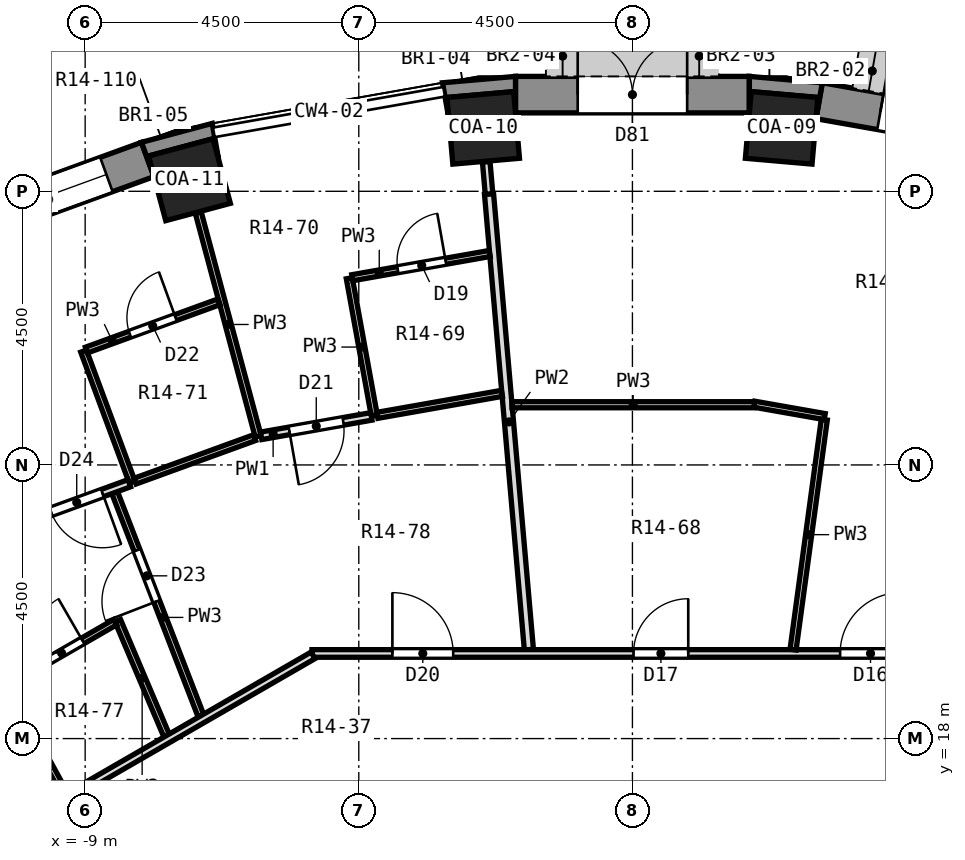
"""IFC4 building model, lengths in metres.
Left out: names, types, materials, properties, quantities, classifications, styles, units other than length and angle.
Written with IfcOpenShell. Run it as: python <this file> out.ifc"""

import sys

from ifc_helpers import new_model, si_unit, direction, frame, frame_2d, origin, origin_2d, place, context, subcontext, project, spatial, polyline, rectangle, outline, extrude, element, fill, save


model = new_model("IFC4")
c1 = context("Model", 3, precision=1e-05, world=origin(), true_north=direction((0.0, 1.0)))
c2 = subcontext(c1, "Body", "Model", "MODEL_VIEW")
j1 = project(units=[si_unit("LENGTHUNIT", "METRE"), si_unit("PLANEANGLEUNIT", "RADIAN")], contexts=[c1])
p1 = place(None, origin())
s1 = spatial("IfcSite", under=j1, at=p1, CompositionType="ELEMENT")
p2 = place(p1, origin())
s2 = spatial("IfcBuilding", under=s1, at=p2, CompositionType="ELEMENT")
p3 = place(p2, frame((0.0, 0.0, 75.8)))
s3 = spatial("IfcBuildingStorey", under=s2, at=p3, CompositionType="ELEMENT", Elevation=75.8)
for number, where, z_axis, x_axis in (
    (1, (2.453, 28.043, 0.0), (0.0, 0.0, 1.0), (0.087, 0.996, 0.0)),
    (2, (-2.453, 28.043, 0.0), (0.0, 0.0, 1.0), (-0.087, 0.996, 0.0)),
    (3, (-7.286, 27.191, 0.0), (0.0, 0.0, 1.0), (-0.259, 0.966, 0.0)),
):
    element("IfcColumn", number, at=place(p3, frame(where, z_axis=z_axis, x_axis=x_axis)), inside=s3, PredefinedType="COLUMN", context=c2, shape_type="SweptSolid", body=[
        extrude(rectangle(XDim=1.1, YDim=1.1, at=origin_2d()), origin(), (0.0, 0.0, 1.0), 3.3),
    ])
p4 = place(p3, frame((6.858, 27.821, 0.0), z_axis=(0.0, 0.0, 1.0), x_axis=(-0.984800809218, 0.173687553279, 0.0)))
e4 = element("IfcWall", 4, at=p4, inside=s3, PredefinedType="SOLIDWALL", context=c2, shape_type="SweptSolid", body=[
    extrude(rectangle(XDim=3.846, YDim=0.6, at=frame_2d((1.923, 0.0))), origin(), (0.0, 0.0, 1.0), 2.75),
])
p5 = place(p4, frame((1.023, 0.0, 0.0)))
e5 = element("IfcOpeningElement", 5, at=p5, cuts=e4, PredefinedType="OPENING", context=c2, shape_type="SweptSolid", body=[
    extrude(rectangle(XDim=1.8, YDim=2.4, at=frame_2d((0.9, 1.2))), frame((0.0, 0.312, 0.0), z_axis=(0.0, -1.0, 0.0), x_axis=(1.0, 0.0, 0.0)), (0.0, 0.0, 1.0), 0.624),
])
p6 = place(p3, frame((1.923, 28.59, 0.0), z_axis=(0.0, 0.0, 1.0), x_axis=(-1.0, 0.0, 0.0)))
e6 = element("IfcWall", 6, at=p6, inside=s3, PredefinedType="SOLIDWALL", context=c2, shape_type="SweptSolid", body=[
    extrude(rectangle(XDim=3.846, YDim=0.6, at=frame_2d((1.923, 0.0))), origin(), (0.0, 0.0, 1.0), 2.75),
])
p7 = place(p6, frame((1.023, 0.0, 0.0)))
e7 = element("IfcOpeningElement", 7, at=p7, cuts=e6, PredefinedType="OPENING", context=c2, shape_type="SweptSolid", body=[
    extrude(rectangle(XDim=1.8, YDim=2.4, at=frame_2d((0.9, 1.2))), frame((0.0, 0.312, 0.0), z_axis=(0.0, -1.0, 0.0), x_axis=(1.0, 0.0, 0.0)), (0.0, 0.0, 1.0), 0.624),
])
p8 = place(p3, frame((-7.971, 27.523, 0.0), z_axis=(0.0, 0.0, 1.0), x_axis=(-0.939689588564, -0.342028474173, 0.0)))
e8 = element("IfcWall", 8, at=p8, inside=s3, PredefinedType="SOLIDWALL", context=c2, shape_type="SweptSolid", body=[
    extrude(rectangle(XDim=3.846, YDim=0.6, at=frame_2d((1.923, 0.0))), origin(), (0.0, 0.0, 1.0), 2.75),
])
p9 = place(p8, frame((0.723, 0.0, 0.9)))
e9 = element("IfcOpeningElement", 9, at=p9, cuts=e8, PredefinedType="OPENING", context=c2, shape_type="SweptSolid", body=[
    extrude(rectangle(XDim=2.4, YDim=1.8, at=frame_2d((1.2, 0.9))), frame((0.0, 0.312, 0.0), z_axis=(0.0, -1.0, 0.0), x_axis=(1.0, 0.0, 0.0)), (0.0, 0.0, 1.0), 0.624),
])
p10 = place(p3, origin())
e10 = element("IfcWall", 10, at=p10, inside=s3, PredefinedType="SOLIDWALL", context=c2, shape_type="SweptSolid", body=[
    extrude(outline(polyline([(3.123, 28.785), (1.923, 28.89), (1.923, 28.29), (1.954, 28.639), (3.049, 28.543), (3.019, 28.194), (3.123, 28.785)])), origin(), (0.0, 0.0, 1.0), 2.75),
])
p11 = place(p3, origin())
e11 = element("IfcWall", 11, at=p11, inside=s3, PredefinedType="SOLIDWALL", context=c2, shape_type="SweptSolid", body=[
    extrude(outline(polyline([(-1.923, 28.89), (-3.123, 28.785), (-3.019, 28.194), (-3.049, 28.543), (-1.954, 28.639), (-1.923, 28.29), (-1.923, 28.89)])), origin(), (0.0, 0.0, 1.0), 2.75),
])
p12 = place(p3, origin())
e12 = element("IfcWall", 12, at=p12, inside=s3, PredefinedType="SOLIDWALL", context=c2, shape_type="SweptSolid", body=[
    extrude(outline(polyline([(-6.91, 28.117), (-8.074, 27.805), (-7.869, 27.241), (-7.959, 27.58), (-6.897, 27.865), (-6.806, 27.526), (-6.91, 28.117)])), origin(), (0.0, 0.0, 1.0), 2.75),
])
p13 = place(p3, frame((-2.405, 27.485, 0.0), z_axis=(0.0, 0.0, 1.0), x_axis=(0.087200931266, -0.996190743576, 0.0)))
e13 = element("IfcWall", 13, at=p13, inside=s3, PredefinedType="PARTITIONING", context=c2, shape_type="SweptSolid", body=[
    extrude(rectangle(XDim=0.535, YDim=0.125, at=frame_2d((0.267, 0.0))), origin(), (0.0, 0.0, 1.0), 2.75),
])
p14 = place(p3, frame((-2.358, 26.952, 0.0), z_axis=(0.0, 0.0, 1.0), x_axis=(0.087150838373, -0.996195127157, 0.0)))
e14 = element("IfcWall", 14, at=p14, inside=s3, PredefinedType="PARTITIONING", context=c2, shape_type="SweptSolid", body=[
    extrude(rectangle(XDim=7.519, YDim=0.15, at=frame_2d((3.759, 0.0))), origin(), (0.0, 0.0, 1.0), 2.75),
])
p15 = place(p3, frame((-4.656, 25.57, 0.0), z_axis=(0.0, 0.0, 1.0), x_axis=(0.179146935465, -0.983822329241, 0.0)))
e15 = element("IfcWall", 15, at=p15, inside=s3, PredefinedType="PARTITIONING", context=c2, shape_type="SweptSolid", body=[
    extrude(rectangle(XDim=2.3, YDim=0.1, at=frame_2d((1.15, 0.0))), origin(), (0.0, 0.0, 1.0), 2.75),
])
p16 = place(p3, frame((-7.14, 26.65, 0.0), z_axis=(0.0, 0.0, 1.0), x_axis=(0.258575921205, -0.965990938349, 0.0)))
e16 = element("IfcWall", 16, at=p16, inside=s3, PredefinedType="PARTITIONING", context=c2, shape_type="SweptSolid", body=[
    extrude(rectangle(XDim=3.81, YDim=0.1, at=frame_2d((1.905, 0.0))), origin(), (0.0, 0.0, 1.0), 2.75),
])
p17 = place(p3, frame((-9.026, 24.372, 0.0), z_axis=(0.0, 0.0, 1.0), x_axis=(0.347431936108, -0.937705204087, 0.0)))
e17 = element("IfcWall", 17, at=p17, inside=s3, PredefinedType="PARTITIONING", context=c2, shape_type="SweptSolid", body=[
    extrude(rectangle(XDim=2.299, YDim=0.1, at=frame_2d((1.15, 0.0))), origin(), (0.0, 0.0, 1.0), 2.75),
])
p18 = place(p3, frame((-8.514, 22.045, 0.0), z_axis=(0.0, 0.0, 1.0), x_axis=(0.360450824224, -0.932778217647, 0.0)))
e18 = element("IfcWall", 18, at=p18, inside=s3, PredefinedType="PARTITIONING", context=c2, shape_type="SweptSolid", body=[
    extrude(rectangle(XDim=3.934, YDim=0.1, at=frame_2d((1.967, 0.0))), origin(), (0.0, 0.0, 1.0), 2.75),
])
p19 = place(p18, frame((1.017, 0.0, 0.0)))
e19 = element("IfcOpeningElement", 19, at=p19, cuts=e18, PredefinedType="OPENING", context=c2, shape_type="SweptSolid", body=[
    extrude(rectangle(XDim=0.9, YDim=2.1, at=frame_2d((0.45, 1.05))), frame((0.0, 0.062, 0.0), z_axis=(0.0, -1.0, 0.0), x_axis=(1.0, 0.0, 0.0)), (0.0, 0.0, 1.0), 0.124),
])
p20 = place(p3, frame((-8.464, 19.939, 0.0), z_axis=(0.0, 0.0, 1.0), x_axis=(0.391032350376, -0.920376934174, 0.0)))
e20 = element("IfcWall", 20, at=p20, inside=s3, PredefinedType="PARTITIONING", context=c2, shape_type="SweptSolid", body=[
    extrude(rectangle(XDim=2.053, YDim=0.1, at=frame_2d((1.026, 0.0))), origin(), (0.0, 0.0, 1.0), 2.75),
])
p21 = place(p3, frame((-10.31, 18.874, 0.0), z_axis=(0.0, 0.0, 1.0), x_axis=(0.479305195881, -0.877648294707, 0.0)))
e21 = element("IfcWall", 21, at=p21, inside=s3, PredefinedType="PARTITIONING", context=c2, shape_type="SweptSolid", body=[
    extrude(rectangle(XDim=2.039, YDim=0.1, at=frame_2d((1.019, 0.0))), origin(), (0.0, 0.0, 1.0), 2.75),
])
p22 = place(p3, frame((2.005, 23.499, 0.0), z_axis=(0.0, 0.0, 1.0), x_axis=(0.984835805664, -0.17348900796, 0.0)))
e22 = element("IfcWall", 22, at=p22, inside=s3, PredefinedType="PARTITIONING", context=c2, shape_type="SweptSolid", body=[
    extrude(rectangle(XDim=1.175, YDim=0.1, at=frame_2d((0.587, 0.0))), origin(), (0.0, 0.0, 1.0), 2.75),
])
p23 = place(p3, frame((-5.27, 19.4, 0.0), z_axis=(0.0, 0.0, 1.0), x_axis=(1.0, 0.0, 0.0)))
e23 = element("IfcWall", 23, at=p23, inside=s3, PredefinedType="PARTITIONING", context=c2, shape_type="SweptSolid", body=[
    extrude(rectangle(XDim=10.406, YDim=0.125, at=frame_2d((5.203, 0.0))), origin(), (0.0, 0.0, 1.0), 2.75),
])
p24 = place(p23, frame((8.686, 0.0, 0.0)))
e24 = element("IfcOpeningElement", 24, at=p24, cuts=e23, PredefinedType="OPENING", context=c2, shape_type="SweptSolid", body=[
    extrude(rectangle(XDim=1.0, YDim=2.1, at=frame_2d((0.5, 1.05))), frame((0.0, 0.074, 0.0), z_axis=(0.0, -1.0, 0.0), x_axis=(1.0, 0.0, 0.0)), (0.0, 0.0, 1.0), 0.149),
])
p25 = place(p23, frame((5.288, 0.0, 0.0)))
e25 = element("IfcOpeningElement", 25, at=p25, cuts=e23, PredefinedType="OPENING", context=c2, shape_type="SweptSolid", body=[
    extrude(rectangle(XDim=0.9, YDim=2.1, at=frame_2d((0.45, 1.05))), frame((0.0, 0.074, 0.0), z_axis=(0.0, -1.0, 0.0), x_axis=(1.0, 0.0, 0.0)), (0.0, 0.0, 1.0), 0.149),
])
p26 = place(p23, frame((1.323, 0.0, 0.0)))
e26 = element("IfcOpeningElement", 26, at=p26, cuts=e23, PredefinedType="OPENING", context=c2, shape_type="SweptSolid", body=[
    extrude(rectangle(XDim=1.0, YDim=2.1, at=frame_2d((0.5, 1.05))), frame((0.0, 0.074, 0.0), z_axis=(0.0, -1.0, 0.0), x_axis=(1.0, 0.0, 0.0)), (0.0, 0.0, 1.0), 0.149),
])
p27 = place(p3, frame((-1.98, 23.49, 0.0), z_axis=(0.0, 0.0, 1.0), x_axis=(1.0, 0.0, 0.0)))
e27 = element("IfcWall", 27, at=p27, inside=s3, PredefinedType="PARTITIONING", context=c2, shape_type="SweptSolid", body=[
    extrude(rectangle(XDim=3.985, YDim=0.1, at=frame_2d((1.992, 0.0))), origin(), (0.0, 0.0, 1.0), 2.75),
])
p28 = place(p3, frame((-4.195, 23.316, 0.0), z_axis=(0.0, 0.0, 1.0), x_axis=(0.984788286148, 0.173758543574, 0.0)))
e28 = element("IfcWall", 28, at=p28, inside=s3, PredefinedType="PARTITIONING", context=c2, shape_type="SweptSolid", body=[
    extrude(rectangle(XDim=2.08, YDim=0.1, at=frame_2d((1.04, 0.0))), origin(), (0.0, 0.0, 1.0), 2.75),
])
p29 = place(p3, frame((-6.106, 22.979, 0.0), z_axis=(0.0, 0.0, 1.0), x_axis=(0.984808921368, 0.173641551464, 0.0)))
e29 = element("IfcWall", 29, at=p29, inside=s3, PredefinedType="PARTITIONING", context=c2, shape_type="SweptSolid", body=[
    extrude(rectangle(XDim=1.841, YDim=0.125, at=frame_2d((0.92, 0.0))), origin(), (0.0, 0.0, 1.0), 2.75),
])
p30 = place(p29, frame((0.47, 0.0, 0.0)))
e30 = element("IfcOpeningElement", 30, at=p30, cuts=e29, PredefinedType="OPENING", context=c2, shape_type="SweptSolid", body=[
    extrude(rectangle(XDim=0.9, YDim=2.1, at=frame_2d((0.45, 1.05))), frame((0.0, 0.074, 0.0), z_axis=(0.0, -1.0, 0.0), x_axis=(1.0, 0.0, 0.0)), (0.0, 0.0, 1.0), 0.149),
])
p31 = place(p3, frame((-4.607, 25.579, 0.0), z_axis=(0.0, 0.0, 1.0), x_axis=(0.984796414822, 0.173712467465, 0.0)))
e31 = element("IfcWall", 31, at=p31, inside=s3, PredefinedType="PARTITIONING", context=c2, shape_type="SweptSolid", body=[
    extrude(rectangle(XDim=2.294, YDim=0.1, at=frame_2d((1.147, 0.0))), origin(), (0.0, 0.0, 1.0), 2.75),
])
p32 = place(p31, frame((0.76, 0.0, 0.0)))
e32 = element("IfcOpeningElement", 32, at=p32, cuts=e31, PredefinedType="OPENING", context=c2, shape_type="SweptSolid", body=[
    extrude(rectangle(XDim=0.8, YDim=2.1, at=frame_2d((0.4, 1.05))), frame((0.0, 0.062, 0.0), z_axis=(0.0, -1.0, 0.0), x_axis=(1.0, 0.0, 0.0)), (0.0, 0.0, 1.0), 0.124),
])
p33 = place(p3, frame((-8.18, 22.233, 0.0), z_axis=(0.0, 0.0, 1.0), x_axis=(0.939708229367, 0.341977256056, 0.0)))
e33 = element("IfcWall", 33, at=p33, inside=s3, PredefinedType="PARTITIONING", context=c2, shape_type="SweptSolid", body=[
    extrude(rectangle(XDim=2.093, YDim=0.1, at=frame_2d((1.046, 0.0))), origin(), (0.0, 0.0, 1.0), 2.75),
])
p34 = place(p3, frame((-10.11, 21.53, 0.0), z_axis=(0.0, 0.0, 1.0), x_axis=(0.939599898996, 0.342274786986, 0.0)))
e34 = element("IfcWall", 34, at=p34, inside=s3, PredefinedType="PARTITIONING", context=c2, shape_type="SweptSolid", body=[
    extrude(rectangle(XDim=1.954, YDim=0.125, at=frame_2d((0.977, 0.0))), origin(), (0.0, 0.0, 1.0), 2.75),
])
p35 = place(p34, frame((0.583, 0.0, 0.0)))
e35 = element("IfcOpeningElement", 35, at=p35, cuts=e34, PredefinedType="OPENING", context=c2, shape_type="SweptSolid", body=[
    extrude(rectangle(XDim=0.9, YDim=2.1, at=frame_2d((0.45, 1.05))), frame((0.0, 0.074, 0.0), z_axis=(0.0, -1.0, 0.0), x_axis=(1.0, 0.0, 0.0)), (0.0, 0.0, 1.0), 0.149),
])
p36 = place(p3, frame((-8.979, 24.389, 0.0), z_axis=(0.0, 0.0, 1.0), x_axis=(0.93967659433, 0.342064172443, 0.0)))
e36 = element("IfcWall", 36, at=p36, inside=s3, PredefinedType="PARTITIONING", context=c2, shape_type="SweptSolid", body=[
    extrude(rectangle(XDim=2.32, YDim=0.1, at=frame_2d((1.16, 0.0))), origin(), (0.0, 0.0, 1.0), 2.75),
])
p37 = place(p36, frame((0.76, 0.0, 0.0)))
e37 = element("IfcOpeningElement", 37, at=p37, cuts=e36, PredefinedType="OPENING", context=c2, shape_type="SweptSolid", body=[
    extrude(rectangle(XDim=0.8, YDim=2.1, at=frame_2d((0.4, 1.05))), frame((0.0, 0.062, 0.0), z_axis=(0.0, -1.0, 0.0), x_axis=(1.0, 0.0, 0.0)), (0.0, 0.0, 1.0), 0.124),
])
p38 = place(p3, frame((-14.137, 14.24, 0.0), z_axis=(0.0, 0.0, 1.0), x_axis=(0.866045301435, 0.499965534674, 0.0)))
e38 = element("IfcWall", 38, at=p38, inside=s3, PredefinedType="PARTITIONING", context=c2, shape_type="SweptSolid", body=[
    extrude(rectangle(XDim=10.259, YDim=0.125, at=frame_2d((5.129, 0.0))), origin(), (0.0, 0.0, 1.0), 2.75),
])
p39 = place(p3, frame((-10.267, 18.899, 0.0), z_axis=(0.0, 0.0, 1.0), x_axis=(0.866149564305, 0.499784885981, 0.0)))
e39 = element("IfcWall", 39, at=p39, inside=s3, PredefinedType="PARTITIONING", context=c2, shape_type="SweptSolid", body=[
    extrude(rectangle(XDim=2.031, YDim=0.1, at=frame_2d((1.016, 0.0))), origin(), (0.0, 0.0, 1.0), 2.75),
])
p40 = place(p39, frame((0.615, 0.0, 0.0)))
e40 = element("IfcOpeningElement", 40, at=p40, cuts=e39, PredefinedType="OPENING", context=c2, shape_type="SweptSolid", body=[
    extrude(rectangle(XDim=0.8, YDim=2.1, at=frame_2d((0.4, 1.05))), frame((0.0, 0.062, 0.0), z_axis=(0.0, -1.0, 0.0), x_axis=(1.0, 0.0, 0.0)), (0.0, 0.0, 1.0), 0.124),
])
p41 = place(p3, frame((2.641, 19.462, 0.0), z_axis=(0.0, 0.0, 1.0), x_axis=(0.134568047679, 0.990904354892, 0.0)))
e41 = element("IfcWall", 41, at=p41, inside=s3, PredefinedType="PARTITIONING", context=c2, shape_type="SweptSolid", body=[
    extrude(rectangle(XDim=3.817, YDim=0.1, at=frame_2d((1.909, 0.0))), origin(), (0.0, 0.0, 1.0), 2.75),
])
p42 = place(p5, frame((1.8, 0.0, 0.0), z_axis=(0.0, 0.0, 1.0), x_axis=(-1.0, 0.0, 0.0)))
e42 = element("IfcDoor", 42, at=p42, inside=s3, OperationType="DOUBLE_DOOR_SINGLE_SWING", PredefinedType="DOOR", context=c2, shape_type="SweptSolid", body=[
    extrude(rectangle(XDim=1.8, YDim=2.4, at=frame_2d((0.9, 1.2))), frame((0.0, -0.075, 0.0), z_axis=(0.0, -1.0, 0.0), x_axis=(1.0, 0.0, 0.0)), (0.0, 0.0, 1.0), 0.05),
])
fill(e5, e42)
p43 = place(p7, frame((1.8, 0.0, 0.0), z_axis=(0.0, 0.0, 1.0), x_axis=(-1.0, 0.0, 0.0)))
e43 = element("IfcDoor", 43, at=p43, inside=s3, OperationType="DOUBLE_DOOR_SINGLE_SWING", PredefinedType="DOOR", context=c2, shape_type="SweptSolid", body=[
    extrude(rectangle(XDim=1.8, YDim=2.4, at=frame_2d((0.9, 1.2))), frame((0.0, -0.075, 0.0), z_axis=(0.0, -1.0, 0.0), x_axis=(1.0, 0.0, 0.0)), (0.0, 0.0, 1.0), 0.05),
])
fill(e7, e43)
p44 = place(p9, origin())
e44 = element("IfcWindow", 44, at=p44, inside=s3, PartitioningType="SINGLE_PANEL", PredefinedType="WINDOW", context=c2, shape_type="SweptSolid", body=[
    extrude(rectangle(XDim=2.4, YDim=1.8, at=frame_2d((1.2, 0.9))), frame((0.0, 0.18, 0.0), z_axis=(0.0, -1.0, 0.0), x_axis=(1.0, 0.0, 0.0)), (0.0, 0.0, 1.0), 0.06),
])
fill(e9, e44)
p45 = place(p24, origin())
e45 = element("IfcDoor", 45, at=p45, inside=s3, OperationType="SINGLE_SWING_RIGHT", PredefinedType="DOOR", context=c2, shape_type="SweptSolid", body=[
    extrude(rectangle(XDim=1.0, YDim=2.1, at=frame_2d((0.5, 1.05))), frame((0.0, 0.025, 0.0), z_axis=(0.0, -1.0, 0.0), x_axis=(1.0, 0.0, 0.0)), (0.0, 0.0, 1.0), 0.05),
])
fill(e24, e45)
p46 = place(p25, origin())
e46 = element("IfcDoor", 46, at=p46, inside=s3, OperationType="SINGLE_SWING_RIGHT", PredefinedType="DOOR", context=c2, shape_type="SweptSolid", body=[
    extrude(rectangle(XDim=0.9, YDim=2.1, at=frame_2d((0.45, 1.05))), frame((0.0, 0.025, 0.0), z_axis=(0.0, -1.0, 0.0), x_axis=(1.0, 0.0, 0.0)), (0.0, 0.0, 1.0), 0.05),
])
fill(e25, e46)
p47 = place(p32, origin())
e47 = element("IfcDoor", 47, at=p47, inside=s3, OperationType="SINGLE_SWING_RIGHT", PredefinedType="DOOR", context=c2, shape_type="SweptSolid", body=[
    extrude(rectangle(XDim=0.8, YDim=2.1, at=frame_2d((0.4, 1.05))), frame((0.0, 0.025, 0.0), z_axis=(0.0, -1.0, 0.0), x_axis=(1.0, 0.0, 0.0)), (0.0, 0.0, 1.0), 0.05),
])
fill(e32, e47)
p48 = place(p26, origin())
e48 = element("IfcDoor", 48, at=p48, inside=s3, OperationType="SINGLE_SWING_LEFT", PredefinedType="DOOR", context=c2, shape_type="SweptSolid", body=[
    extrude(rectangle(XDim=1.0, YDim=2.1, at=frame_2d((0.5, 1.05))), frame((0.0, 0.025, 0.0), z_axis=(0.0, -1.0, 0.0), x_axis=(1.0, 0.0, 0.0)), (0.0, 0.0, 1.0), 0.05),
])
fill(e26, e48)
p49 = place(p30, frame((0.9, 0.0, 0.0), z_axis=(0.0, 0.0, 1.0), x_axis=(-1.0, 0.0, 0.0)))
e49 = element("IfcDoor", 49, at=p49, inside=s3, OperationType="SINGLE_SWING_RIGHT", PredefinedType="DOOR", context=c2, shape_type="SweptSolid", body=[
    extrude(rectangle(XDim=0.9, YDim=2.1, at=frame_2d((0.45, 1.05))), frame((0.0, 0.025, 0.0), z_axis=(0.0, -1.0, 0.0), x_axis=(1.0, 0.0, 0.0)), (0.0, 0.0, 1.0), 0.05),
])
fill(e30, e49)
p50 = place(p37, origin())
e50 = element("IfcDoor", 50, at=p50, inside=s3, OperationType="SINGLE_SWING_RIGHT", PredefinedType="DOOR", context=c2, shape_type="SweptSolid", body=[
    extrude(rectangle(XDim=0.8, YDim=2.1, at=frame_2d((0.4, 1.05))), frame((0.0, 0.025, 0.0), z_axis=(0.0, -1.0, 0.0), x_axis=(1.0, 0.0, 0.0)), (0.0, 0.0, 1.0), 0.05),
])
fill(e37, e50)
p51 = place(p19, frame((0.9, 0.0, 0.0), z_axis=(0.0, 0.0, 1.0), x_axis=(-1.0, 0.0, 0.0)))
e51 = element("IfcDoor", 51, at=p51, inside=s3, OperationType="SINGLE_SWING_LEFT", PredefinedType="DOOR", context=c2, shape_type="SweptSolid", body=[
    extrude(rectangle(XDim=0.9, YDim=2.1, at=frame_2d((0.45, 1.05))), frame((0.0, 0.025, 0.0), z_axis=(0.0, -1.0, 0.0), x_axis=(1.0, 0.0, 0.0)), (0.0, 0.0, 1.0), 0.05),
])
fill(e19, e51)
p52 = place(p35, frame((0.9, 0.0, 0.0), z_axis=(0.0, 0.0, 1.0), x_axis=(-1.0, 0.0, 0.0)))
e52 = element("IfcDoor", 52, at=p52, inside=s3, OperationType="SINGLE_SWING_LEFT", PredefinedType="DOOR", context=c2, shape_type="SweptSolid", body=[
    extrude(rectangle(XDim=0.9, YDim=2.1, at=frame_2d((0.45, 1.05))), frame((0.0, 0.025, 0.0), z_axis=(0.0, -1.0, 0.0), x_axis=(1.0, 0.0, 0.0)), (0.0, 0.0, 1.0), 0.05),
])
fill(e35, e52)
p53 = place(p40, origin())
e53 = element("IfcDoor", 53, at=p53, inside=s3, OperationType="SINGLE_SWING_RIGHT", PredefinedType="DOOR", context=c2, shape_type="SweptSolid", body=[
    extrude(rectangle(XDim=0.8, YDim=2.1, at=frame_2d((0.4, 1.05))), frame((0.0, 0.025, 0.0), z_axis=(0.0, -1.0, 0.0), x_axis=(1.0, 0.0, 0.0)), (0.0, 0.0, 1.0), 0.05),
])
fill(e40, e53)
save(model, sys.argv[1])
